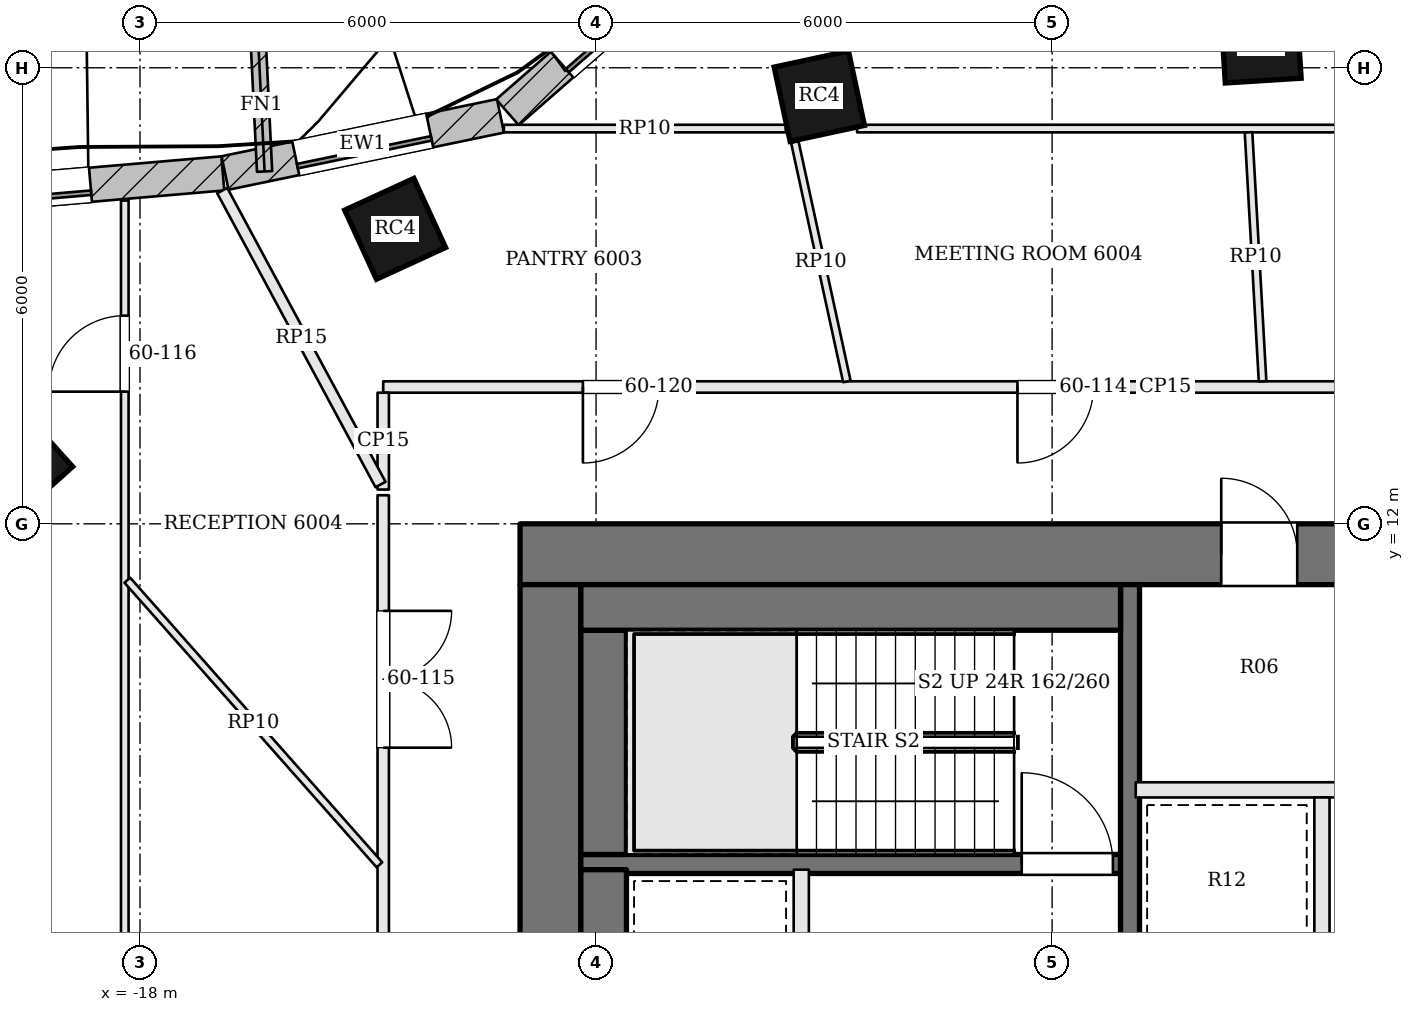
"""IFC4 building model, lengths in metres.
Left out: names, types, materials, properties, quantities, classifications, styles, units other than length and angle.
Written with IfcOpenShell. Run it as: python <this file> out.ifc"""

import sys

from ifc_helpers import new_model, si_unit, direction, frame, frame_2d, origin, origin_2d, place, context, subcontext, project, spatial, rectangle, extrude, element, fill, save


model = new_model("IFC4")
c1 = context("Model", 3, precision=1e-05, world=origin(), true_north=direction((0.0, 1.0)))
c2 = subcontext(c1, "Body", "Model", "MODEL_VIEW")
j1 = project(units=[si_unit("LENGTHUNIT", "METRE"), si_unit("PLANEANGLEUNIT", "RADIAN")], contexts=[c1])
p1 = place(None, origin())
s1 = spatial("IfcSite", under=j1, at=p1, CompositionType="ELEMENT")
p2 = place(p1, origin())
s2 = spatial("IfcBuilding", under=s1, at=p2, CompositionType="ELEMENT")
p3 = place(p2, frame((0.0, 0.0, 244.8)))
s3 = spatial("IfcBuildingStorey", under=s2, at=p3, CompositionType="ELEMENT", Elevation=244.8)
p4 = place(p3, frame((-13.0, 11.6, 0.0), z_axis=(0.0, 0.0, 1.0), x_axis=(1.0, 0.0, 0.0)))
e1 = element("IfcWall", 1, at=p4, inside=s3, PredefinedType="SHEAR", context=c2, shape_type="SweptSolid", body=[
    extrude(rectangle(XDim=26.0, YDim=0.8, at=frame_2d((13.0, 0.0))), origin(), (0.0, 0.0, 1.0), 3.9),
])
p5 = place(p4, frame((9.225, 0.0, 0.0)))
e2 = element("IfcOpeningElement", 2, at=p5, cuts=e1, PredefinedType="OPENING", context=c2, shape_type="SweptSolid", body=[
    extrude(rectangle(XDim=1.0, YDim=2.1, at=frame_2d((0.5, 1.05))), frame((0.0, 0.41, 0.0), z_axis=(0.0, -1.0, 0.0), x_axis=(1.0, 0.0, 0.0)), (0.0, 0.0, 1.0), 0.82),
])
p6 = place(p4, frame((11.825, 0.0, 0.0)))
e3 = element("IfcOpeningElement", 3, at=p6, cuts=e1, PredefinedType="OPENING", context=c2, shape_type="SweptSolid", body=[
    extrude(rectangle(XDim=0.7, YDim=2.1, at=frame_2d((0.35, 1.05))), frame((0.0, 0.41, 0.0), z_axis=(0.0, -1.0, 0.0), x_axis=(1.0, 0.0, 0.0)), (0.0, 0.0, 1.0), 0.82),
])
p7 = place(p4, frame((14.125, 0.0, 0.0)))
e4 = element("IfcOpeningElement", 4, at=p7, cuts=e1, PredefinedType="OPENING", context=c2, shape_type="SweptSolid", body=[
    extrude(rectangle(XDim=1.0, YDim=2.1, at=frame_2d((0.5, 1.05))), frame((0.0, 0.41, 0.0), z_axis=(0.0, -1.0, 0.0), x_axis=(1.0, 0.0, 0.0)), (0.0, 0.0, 1.0), 0.82),
])
p8 = place(p4, frame((16.625, 0.0, 0.0)))
e5 = element("IfcOpeningElement", 5, at=p8, cuts=e1, PredefinedType="OPENING", context=c2, shape_type="SweptSolid", body=[
    extrude(rectangle(XDim=0.9, YDim=2.1, at=frame_2d((0.45, 1.05))), frame((0.0, 0.41, 0.0), z_axis=(0.0, -1.0, 0.0), x_axis=(1.0, 0.0, 0.0)), (0.0, 0.0, 1.0), 0.82),
])
p9 = place(p3, frame((-12.6, -2.2, 0.0), z_axis=(0.0, 0.0, 1.0), x_axis=(0.0, 1.0, 0.0)))
e6 = element("IfcWall", 6, at=p9, inside=s3, PredefinedType="SHEAR", context=c2, shape_type="SweptSolid", body=[
    extrude(rectangle(XDim=13.4, YDim=0.8, at=frame_2d((6.7, 0.0))), origin(), (0.0, 0.0, 1.0), 3.9),
])
p10 = place(p9, frame((4.2, 0.0, 0.0)))
e7 = element("IfcOpeningElement", 7, at=p10, cuts=e6, PredefinedType="OPENING", context=c2, shape_type="SweptSolid", body=[
    extrude(rectangle(XDim=1.8, YDim=2.1, at=frame_2d((0.9, 1.05))), frame((0.0, 0.41, 0.0), z_axis=(0.0, -1.0, 0.0), x_axis=(1.0, 0.0, 0.0)), (0.0, 0.0, 1.0), 0.82),
])
for number, where, z_axis, x_axis in (
    (8, (-3.254, 18.33, 0.0), (0.0, 0.0, 1.0), (-0.998, -0.063, 0.0)),
    (9, (-9.063, 17.625, 0.0), (0.0, 0.0, 1.0), (-0.978, -0.21, 0.0)),
    (10, (-14.643, 15.881, 0.0), (0.0, 0.0, 1.0), (-0.909, -0.417, 0.0)),
    (11, (-19.593, 12.79, 0.0), (0.0, 0.0, 1.0), (-0.744, -0.668, 0.0)),
):
    element("IfcColumn", number, at=place(p3, frame(where, z_axis=z_axis, x_axis=x_axis)), inside=s3, PredefinedType="COLUMN", context=c2, shape_type="SweptSolid", body=[
        extrude(rectangle(XDim=1.0, YDim=1.0, at=origin_2d()), origin(), (0.0, 0.0, 1.0), 3.9),
    ])
p11 = place(p3, frame((-10.146, 20.051, 0.0), z_axis=(0.0, 0.0, 1.0), x_axis=(-0.753278140428, -0.657702093013, 0.0)))
e12 = element("IfcWall", 12, at=p11, inside=s3, PredefinedType="SOLIDWALL", context=c2, shape_type="SweptSolid", body=[
    extrude(rectangle(XDim=4.008, YDim=0.45, at=frame_2d((2.004, 0.0))), origin(), (0.0, 0.0, 1.0), 3.7),
])
p12 = place(p11, frame((0.954, 0.0, 0.9)))
e13 = element("IfcOpeningElement", 13, at=p12, cuts=e12, PredefinedType="OPENING", context=c2, shape_type="SweptSolid", body=[
    extrude(rectangle(XDim=2.1, YDim=2.3, at=frame_2d((1.05, 1.15))), frame((0.0, 0.235, 0.0), z_axis=(0.0, -1.0, 0.0), x_axis=(1.0, 0.0, 0.0)), (0.0, 0.0, 1.0), 0.47),
])
p13 = place(p3, frame((-13.258, 17.367, 0.0), z_axis=(0.0, 0.0, 1.0), x_axis=(-0.97914968674, -0.203140077183, 0.0)))
e14 = element("IfcWall", 14, at=p13, inside=s3, PredefinedType="SOLIDWALL", context=c2, shape_type="SweptSolid", body=[
    extrude(rectangle(XDim=3.7, YDim=0.45, at=frame_2d((1.85, 0.0))), origin(), (0.0, 0.0, 1.0), 3.7),
])
p14 = place(p13, frame((0.95, 0.0, 0.9)))
e15 = element("IfcOpeningElement", 15, at=p14, cuts=e14, PredefinedType="OPENING", context=c2, shape_type="SweptSolid", body=[
    extrude(rectangle(XDim=1.8, YDim=2.3, at=frame_2d((0.9, 1.15))), frame((0.0, 0.235, 0.0), z_axis=(0.0, -1.0, 0.0), x_axis=(1.0, 0.0, 0.0)), (0.0, 0.0, 1.0), 0.47),
])
p15 = place(p3, frame((-16.91, 16.61, 0.0), z_axis=(0.0, 0.0, 1.0), x_axis=(-0.996333165816, -0.085558299972, 0.0)))
e16 = element("IfcWall", 16, at=p15, inside=s3, PredefinedType="SOLIDWALL", context=c2, shape_type="SweptSolid", body=[
    extrude(rectangle(XDim=5.596, YDim=0.45, at=frame_2d((2.798, 0.0))), origin(), (0.0, 0.0, 1.0), 3.7),
])
p16 = place(p15, frame((1.748, 0.0, 0.9)))
e17 = element("IfcOpeningElement", 17, at=p16, cuts=e16, PredefinedType="OPENING", context=c2, shape_type="SweptSolid", body=[
    extrude(rectangle(XDim=2.1, YDim=2.3, at=frame_2d((1.05, 1.15))), frame((0.0, 0.235, 0.0), z_axis=(0.0, -1.0, 0.0), x_axis=(1.0, 0.0, 0.0)), (0.0, 0.0, 1.0), 0.47),
])
p17 = place(p3, frame((-16.361, 16.636, 0.0), z_axis=(0.0, 0.0, 1.0), x_axis=(-0.048552811097, 0.998820616795, 0.0)))
e18 = element("IfcWall", 18, at=p17, inside=s3, PredefinedType="SOLIDWALL", context=c2, shape_type="SweptSolid", body=[
    extrude(rectangle(XDim=1.75, YDim=0.2, at=frame_2d((0.875, 0.0))), origin(), (0.0, 0.0, 1.0), 3.7),
])
p18 = place(p3, frame((-12.2, 7.525, 0.0), z_axis=(0.0, 0.0, 1.0), x_axis=(1.0, 0.0, 0.0)))
e19 = element("IfcWall", 19, at=p18, inside=s3, PredefinedType="SOLIDWALL", context=c2, shape_type="SweptSolid", body=[
    extrude(rectangle(XDim=7.1, YDim=0.25, at=frame_2d((3.55, 0.0))), origin(), (0.0, 0.0, 1.0), 3.7),
])
p19 = place(p18, frame((5.8, 0.0, 0.0)))
e20 = element("IfcOpeningElement", 20, at=p19, cuts=e19, PredefinedType="OPENING", context=c2, shape_type="SweptSolid", body=[
    extrude(rectangle(XDim=1.2, YDim=2.1, at=frame_2d((0.6, 1.05))), frame((0.0, 0.135, 0.0), z_axis=(0.0, -1.0, 0.0), x_axis=(1.0, 0.0, 0.0)), (0.0, 0.0, 1.0), 0.27),
])
p20 = place(p3, frame((-9.3, 4.45, 0.0), z_axis=(0.0, 0.0, 1.0), x_axis=(0.0, 1.0, 0.0)))
e21 = element("IfcWall", 21, at=p20, inside=s3, PredefinedType="SOLIDWALL", context=c2, shape_type="SweptSolid", body=[
    extrude(rectangle(XDim=3.0, YDim=0.2, at=frame_2d((1.5, 0.0))), origin(), (0.0, 0.0, 1.0), 3.7),
])
p21 = place(p3, frame((-4.975, -2.2, 0.0), z_axis=(0.0, 0.0, 1.0), x_axis=(0.0, 1.0, 0.0)))
e22 = element("IfcWall", 22, at=p21, inside=s3, PredefinedType="SOLIDWALL", context=c2, shape_type="SweptSolid", body=[
    extrude(rectangle(XDim=13.4, YDim=0.25, at=frame_2d((6.7, 0.0))), origin(), (0.0, 0.0, 1.0), 3.7),
])
p22 = place(p21, frame((5.25, 0.0, 0.0)))
e23 = element("IfcOpeningElement", 23, at=p22, cuts=e22, PredefinedType="OPENING", context=c2, shape_type="SweptSolid", body=[
    extrude(rectangle(XDim=1.2, YDim=2.1, at=frame_2d((0.6, 1.05))), frame((0.0, 0.135, 0.0), z_axis=(0.0, -1.0, 0.0), x_axis=(1.0, 0.0, 0.0)), (0.0, 0.0, 1.0), 0.27),
])
p23 = place(p3, frame((-11.9, 4.45, 0.0), z_axis=(0.0, 0.0, 1.0), x_axis=(0.0, 1.0, 0.0)))
e24 = element("IfcWall", 24, at=p23, inside=s3, PredefinedType="SOLIDWALL", context=c2, shape_type="SweptSolid", body=[
    extrude(rectangle(XDim=3.0, YDim=0.6, at=frame_2d((1.5, 0.0))), origin(), (0.0, 0.0, 1.0), 3.7),
])
p24 = place(p3, frame((-11.9, 7.65, 0.0), z_axis=(0.0, 0.0, 1.0), x_axis=(0.0, 1.0, 0.0)))
e25 = element("IfcWall", 25, at=p24, inside=s3, PredefinedType="SOLIDWALL", context=c2, shape_type="SweptSolid", body=[
    extrude(rectangle(XDim=2.95, YDim=0.6, at=frame_2d((1.475, 0.0))), origin(), (0.0, 0.0, 1.0), 3.7),
])
p25 = place(p3, frame((-12.2, 10.9, 0.0), z_axis=(0.0, 0.0, 1.0), x_axis=(1.0, 0.0, 0.0)))
e26 = element("IfcWall", 26, at=p25, inside=s3, PredefinedType="SOLIDWALL", context=c2, shape_type="SweptSolid", body=[
    extrude(rectangle(XDim=7.1, YDim=0.6, at=frame_2d((3.55, 0.0))), origin(), (0.0, 0.0, 1.0), 3.7),
])
p26 = place(p3, frame((-4.9, 8.5, 0.0), z_axis=(0.0, 0.0, 1.0), x_axis=(1.0, 0.0, 0.0)))
e27 = element("IfcWall", 27, at=p26, inside=s3, PredefinedType="SOLIDWALL", context=c2, shape_type="SweptSolid", body=[
    extrude(rectangle(XDim=9.8, YDim=0.2, at=frame_2d((4.9, 0.0))), origin(), (0.0, 0.0, 1.0), 3.7),
])
p27 = place(p3, frame((-2.45, 6.2, 0.0), z_axis=(0.0, 0.0, 1.0), x_axis=(0.0, 1.0, 0.0)))
e28 = element("IfcWall", 28, at=p27, inside=s3, PredefinedType="SOLIDWALL", context=c2, shape_type="SweptSolid", body=[
    extrude(rectangle(XDim=2.2, YDim=0.2, at=frame_2d((1.1, 0.0))), origin(), (0.0, 0.0, 1.0), 3.7),
])
p28 = place(p3, frame((5.777, 13.8, 0.0), z_axis=(0.0, 0.0, 1.0), x_axis=(-1.0, 0.0, 0.0)))
e29 = element("IfcWall", 29, at=p28, inside=s3, PredefinedType="PARTITIONING", context=c2, shape_type="SweptSolid", body=[
    extrude(rectangle(XDim=20.577, YDim=0.15, at=frame_2d((10.289, 0.0))), origin(), (0.0, 0.0, 1.0), 3.084),
])
p29 = place(p28, frame((3.564, 0.0, 0.0)))
e30 = element("IfcOpeningElement", 30, at=p29, cuts=e29, PredefinedType="OPENING", context=c2, shape_type="SweptSolid", body=[
    extrude(rectangle(XDim=1.8, YDim=2.1, at=frame_2d((0.9, 1.05))), frame((0.0, 0.085, 0.0), z_axis=(0.0, -1.0, 0.0), x_axis=(1.0, 0.0, 0.0)), (0.0, 0.0, 1.0), 0.17),
])
p30 = place(p28, frame((11.233, 0.0, 0.0)))
e31 = element("IfcOpeningElement", 31, at=p30, cuts=e29, PredefinedType="OPENING", context=c2, shape_type="SweptSolid", body=[
    extrude(rectangle(XDim=1.0, YDim=2.4, at=frame_2d((0.5, 1.2))), frame((0.0, 0.085, 0.0), z_axis=(0.0, -1.0, 0.0), x_axis=(1.0, 0.0, 0.0)), (0.0, 0.0, 1.0), 0.17),
])
p31 = place(p28, frame((16.95, 0.0, 0.0)))
e32 = element("IfcOpeningElement", 32, at=p31, cuts=e29, PredefinedType="OPENING", context=c2, shape_type="SweptSolid", body=[
    extrude(rectangle(XDim=1.0, YDim=2.1, at=frame_2d((0.5, 1.05))), frame((0.0, 0.085, 0.0), z_axis=(0.0, -1.0, 0.0), x_axis=(1.0, 0.0, 0.0)), (0.0, 0.0, 1.0), 0.17),
])
p32 = place(p3, frame((-14.8, 13.725, 0.0), z_axis=(0.0, 0.0, 1.0), x_axis=(0.0, -1.0, 0.0)))
e33 = element("IfcWall", 33, at=p32, inside=s3, PredefinedType="PARTITIONING", context=c2, shape_type="SweptSolid", body=[
    extrude(rectangle(XDim=1.274, YDim=0.15, at=frame_2d((0.637, 0.0))), origin(), (0.0, 0.0, 1.0), 3.084),
])
p33 = place(p3, frame((-16.918, 16.384, 0.0), z_axis=(0.0, 0.0, 1.0), x_axis=(0.474069987859, -0.880487164365, 0.0)))
e34 = element("IfcWall", 34, at=p33, inside=s3, PredefinedType="PARTITIONING", context=c2, shape_type="SweptSolid", body=[
    extrude(rectangle(XDim=4.392, YDim=0.15, at=frame_2d((2.196, 0.0))), origin(), (0.0, 0.0, 1.0), 3.084),
])
p34 = place(p3, frame((-14.8, 12.376, 0.0), z_axis=(0.0, 0.0, 1.0), x_axis=(0.0, -1.0, 0.0)))
e35 = element("IfcWall", 35, at=p34, inside=s3, PredefinedType="PARTITIONING", context=c2, shape_type="SweptSolid", body=[
    extrude(rectangle(XDim=15.958, YDim=0.15, at=frame_2d((7.979, 0.0))), origin(), (0.0, 0.0, 1.0), 3.084),
])
p35 = place(p34, frame((1.521, 0.0, 0.0)))
e36 = element("IfcOpeningElement", 36, at=p35, cuts=e35, PredefinedType="OPENING", context=c2, shape_type="SweptSolid", body=[
    extrude(rectangle(XDim=1.8, YDim=2.1, at=frame_2d((0.9, 1.05))), frame((0.0, 0.085, 0.0), z_axis=(0.0, -1.0, 0.0), x_axis=(1.0, 0.0, 0.0)), (0.0, 0.0, 1.0), 0.17),
])
p36 = place(p34, frame((6.338, 0.0, 0.0)))
e37 = element("IfcOpeningElement", 37, at=p36, cuts=e35, PredefinedType="OPENING", context=c2, shape_type="SweptSolid", body=[
    extrude(rectangle(XDim=1.0, YDim=2.4, at=frame_2d((0.5, 1.2))), frame((0.0, 0.085, 0.0), z_axis=(0.0, -1.0, 0.0), x_axis=(1.0, 0.0, 0.0)), (0.0, 0.0, 1.0), 0.17),
])
p37 = place(p3, frame((-13.213, 17.2, 0.0), z_axis=(0.0, 0.0, 1.0), x_axis=(1.0, 0.0, 0.0)))
e38 = element("IfcWall", 38, at=p37, inside=s3, PredefinedType="PARTITIONING", context=c2, shape_type="SweptSolid", body=[
    extrude(rectangle(XDim=3.71, YDim=0.1, at=frame_2d((1.855, 0.0))), origin(), (0.0, 0.0, 1.0), 3.084),
])
p38 = place(p3, frame((-8.566, 17.2, 0.0), z_axis=(0.0, 0.0, 1.0), x_axis=(1.0, 0.0, 0.0)))
e39 = element("IfcWall", 39, at=p38, inside=s3, PredefinedType="PARTITIONING", context=c2, shape_type="SweptSolid", body=[
    extrude(rectangle(XDim=14.818, YDim=0.1, at=frame_2d((7.409, 0.0))), origin(), (0.0, 0.0, 1.0), 3.084),
])
p39 = place(p38, frame((9.253, 0.0, 0.0)))
e40 = element("IfcOpeningElement", 40, at=p39, cuts=e39, PredefinedType="OPENING", context=c2, shape_type="SweptSolid", body=[
    extrude(rectangle(XDim=1.0, YDim=2.1, at=frame_2d((0.5, 1.05))), frame((0.0, 0.06, 0.0), z_axis=(0.0, -1.0, 0.0), x_axis=(1.0, 0.0, 0.0)), (0.0, 0.0, 1.0), 0.12),
])
p40 = place(p3, frame((-3.231, 13.875, 0.0), z_axis=(0.0, 0.0, 1.0), x_axis=(-0.056339740822, 0.998411655383, 0.0)))
e41 = element("IfcWall", 41, at=p40, inside=s3, PredefinedType="PARTITIONING", context=c2, shape_type="SweptSolid", body=[
    extrude(rectangle(XDim=3.28, YDim=0.1, at=frame_2d((1.64, 0.0))), origin(), (0.0, 0.0, 1.0), 3.084),
])
p41 = place(p3, frame((-8.7, 13.873, 0.0), z_axis=(0.0, 0.0, 1.0), x_axis=(-0.212558538076, 0.977148334641, 0.0)))
e42 = element("IfcWall", 42, at=p41, inside=s3, PredefinedType="PARTITIONING", context=c2, shape_type="SweptSolid", body=[
    extrude(rectangle(XDim=3.224, YDim=0.1, at=frame_2d((1.612, 0.0))), origin(), (0.0, 0.0, 1.0), 3.084),
])
p42 = place(p3, frame((-18.2, -5.006, 0.0), z_axis=(0.0, 0.0, 1.0), x_axis=(0.0, 1.0, 0.0)))
e43 = element("IfcWall", 43, at=p42, inside=s3, PredefinedType="PARTITIONING", context=c2, shape_type="SweptSolid", body=[
    extrude(rectangle(XDim=21.26, YDim=0.1, at=frame_2d((10.63, 0.0))), origin(), (0.0, 0.0, 1.0), 3.084),
])
p43 = place(p42, frame((18.745, 0.0, 0.0)))
e44 = element("IfcOpeningElement", 44, at=p43, cuts=e43, PredefinedType="OPENING", context=c2, shape_type="SweptSolid", body=[
    extrude(rectangle(XDim=1.0, YDim=2.1, at=frame_2d((0.5, 1.05))), frame((0.0, 0.06, 0.0), z_axis=(0.0, -1.0, 0.0), x_axis=(1.0, 0.0, 0.0)), (0.0, 0.0, 1.0), 0.12),
])
p44 = place(p42, frame((6.489, 0.0, 0.0)))
e45 = element("IfcOpeningElement", 45, at=p44, cuts=e43, PredefinedType="OPENING", context=c2, shape_type="SweptSolid", body=[
    extrude(rectangle(XDim=0.9, YDim=2.1, at=frame_2d((0.45, 1.05))), frame((0.0, 0.06, 0.0), z_axis=(0.0, -1.0, 0.0), x_axis=(1.0, 0.0, 0.0)), (0.0, 0.0, 1.0), 0.12),
])
p45 = place(p42, frame((1.731, 0.0, 0.0)))
e46 = element("IfcOpeningElement", 46, at=p45, cuts=e43, PredefinedType="OPENING", context=c2, shape_type="SweptSolid", body=[
    extrude(rectangle(XDim=0.9, YDim=2.1, at=frame_2d((0.45, 1.05))), frame((0.0, 0.06, 0.0), z_axis=(0.0, -1.0, 0.0), x_axis=(1.0, 0.0, 0.0)), (0.0, 0.0, 1.0), 0.12),
])
p46 = place(p3, frame((-14.85, 7.514, 0.0), z_axis=(0.0, 0.0, 1.0), x_axis=(-0.663136045348, 0.748498888015, 0.0)))
e47 = element("IfcWall", 47, at=p46, inside=s3, PredefinedType="PARTITIONING", context=c2, shape_type="SweptSolid", body=[
    extrude(rectangle(XDim=5.002, YDim=0.1, at=frame_2d((2.501, 0.0))), origin(), (0.0, 0.0, 1.0), 3.084),
])
p47 = place(p12, origin())
e48 = element("IfcWindow", 48, at=p47, inside=s3, PartitioningType="SINGLE_PANEL", PredefinedType="WINDOW", context=c2, shape_type="SweptSolid", body=[
    extrude(rectangle(XDim=2.1, YDim=2.3, at=frame_2d((1.05, 1.15))), frame((0.0, 0.135, 0.0), z_axis=(0.0, -1.0, 0.0), x_axis=(1.0, 0.0, 0.0)), (0.0, 0.0, 1.0), 0.06),
])
fill(e13, e48)
p48 = place(p14, origin())
e49 = element("IfcWindow", 49, at=p48, inside=s3, PartitioningType="SINGLE_PANEL", PredefinedType="WINDOW", context=c2, shape_type="SweptSolid", body=[
    extrude(rectangle(XDim=1.8, YDim=2.3, at=frame_2d((0.9, 1.15))), frame((0.0, 0.135, 0.0), z_axis=(0.0, -1.0, 0.0), x_axis=(1.0, 0.0, 0.0)), (0.0, 0.0, 1.0), 0.06),
])
fill(e15, e49)
p49 = place(p16, origin())
e50 = element("IfcWindow", 50, at=p49, inside=s3, PartitioningType="SINGLE_PANEL", PredefinedType="WINDOW", context=c2, shape_type="SweptSolid", body=[
    extrude(rectangle(XDim=2.1, YDim=2.3, at=frame_2d((1.05, 1.15))), frame((0.0, 0.135, 0.0), z_axis=(0.0, -1.0, 0.0), x_axis=(1.0, 0.0, 0.0)), (0.0, 0.0, 1.0), 0.06),
])
fill(e17, e50)
p50 = place(p19, origin())
e51 = element("IfcDoor", 51, at=p50, inside=s3, OperationType="SINGLE_SWING_LEFT", PredefinedType="DOOR", context=c2, shape_type="SweptSolid", body=[
    extrude(rectangle(XDim=1.2, YDim=2.1, at=frame_2d((0.6, 1.05))), frame((0.0, 0.025, 0.0), z_axis=(0.0, -1.0, 0.0), x_axis=(1.0, 0.0, 0.0)), (0.0, 0.0, 1.0), 0.05),
])
fill(e20, e51)
p51 = place(p5, origin())
e52 = element("IfcDoor", 52, at=p51, inside=s3, OperationType="SINGLE_SWING_LEFT", PredefinedType="DOOR", context=c2, shape_type="SweptSolid", body=[
    extrude(rectangle(XDim=1.0, YDim=2.1, at=frame_2d((0.5, 1.05))), frame((0.0, 0.025, 0.0), z_axis=(0.0, -1.0, 0.0), x_axis=(1.0, 0.0, 0.0)), (0.0, 0.0, 1.0), 0.05),
])
fill(e2, e52)
p52 = place(p30, origin())
e53 = element("IfcDoor", 53, at=p52, inside=s3, OperationType="SINGLE_SWING_RIGHT", PredefinedType="DOOR", context=c2, shape_type="SweptSolid", body=[
    extrude(rectangle(XDim=1.0, YDim=2.4, at=frame_2d((0.5, 1.2))), frame((0.0, 0.025, 0.0), z_axis=(0.0, -1.0, 0.0), x_axis=(1.0, 0.0, 0.0)), (0.0, 0.0, 1.0), 0.05),
])
fill(e31, e53)
p53 = place(p35, origin())
e54 = element("IfcDoor", 54, at=p53, inside=s3, OperationType="DOUBLE_DOOR_SINGLE_SWING", PredefinedType="DOOR", context=c2, shape_type="SweptSolid", body=[
    extrude(rectangle(XDim=1.8, YDim=2.1, at=frame_2d((0.9, 1.05))), frame((0.0, 0.025, 0.0), z_axis=(0.0, -1.0, 0.0), x_axis=(1.0, 0.0, 0.0)), (0.0, 0.0, 1.0), 0.05),
])
fill(e36, e54)
p54 = place(p43, origin())
e55 = element("IfcDoor", 55, at=p54, inside=s3, OperationType="SINGLE_SWING_LEFT", PredefinedType="DOOR", context=c2, shape_type="SweptSolid", body=[
    extrude(rectangle(XDim=1.0, YDim=2.1, at=frame_2d((0.5, 1.05))), frame((0.0, 0.025, 0.0), z_axis=(0.0, -1.0, 0.0), x_axis=(1.0, 0.0, 0.0)), (0.0, 0.0, 1.0), 0.05),
])
fill(e44, e55)
p55 = place(p31, origin())
e56 = element("IfcDoor", 56, at=p55, inside=s3, OperationType="SINGLE_SWING_RIGHT", PredefinedType="DOOR", context=c2, shape_type="SweptSolid", body=[
    extrude(rectangle(XDim=1.0, YDim=2.1, at=frame_2d((0.5, 1.05))), frame((0.0, 0.025, 0.0), z_axis=(0.0, -1.0, 0.0), x_axis=(1.0, 0.0, 0.0)), (0.0, 0.0, 1.0), 0.05),
])
fill(e32, e56)
save(model, sys.argv[1])
